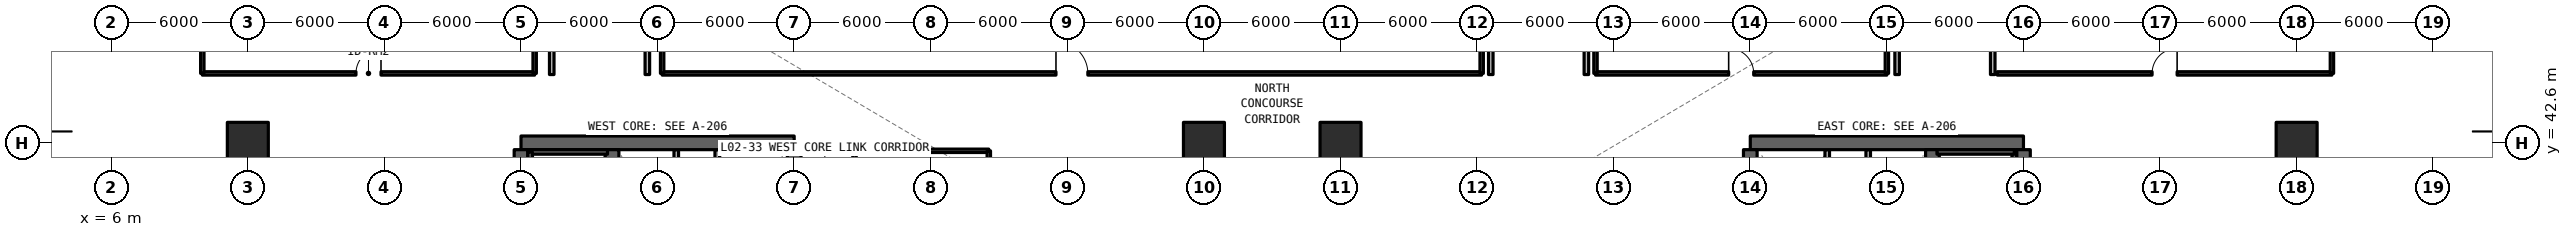
"""IFC4 building model, lengths in metres.
Left out: names, types, materials, properties, quantities, classifications, styles, units other than length and angle.
Written with IfcOpenShell. Run it as: python <this file> out.ifc"""

import sys

from ifc_helpers import new_model, si_unit, direction, frame, frame_2d, origin, origin_2d, place, context, subcontext, project, spatial, rectangle, extrude, element, fill, save


model = new_model("IFC4")
c1 = context("Model", 3, precision=1e-05, world=origin(), true_north=direction((0.0, 1.0)))
c2 = subcontext(c1, "Body", "Model", "MODEL_VIEW")
j1 = project(units=[si_unit("LENGTHUNIT", "METRE"), si_unit("PLANEANGLEUNIT", "RADIAN")], contexts=[c1])
p1 = place(None, origin())
s1 = spatial("IfcSite", under=j1, at=p1, CompositionType="ELEMENT")
p2 = place(p1, origin())
s2 = spatial("IfcBuilding", under=s1, at=p2, CompositionType="ELEMENT")
p3 = place(p2, frame((0.0, 0.0, 4.95)))
s3 = spatial("IfcBuildingStorey", under=s2, at=p3, CompositionType="ELEMENT", Elevation=4.95)
p4 = place(p3, frame((36.0, 42.6, 0.0), z_axis=(0.0, 0.0, 1.0), x_axis=(-1.0, 0.0, 0.0)))
e1 = element("IfcWall", 1, at=p4, inside=s3, PredefinedType="SHEAR", context=c2, shape_type="SweptSolid", body=[
    extrude(rectangle(XDim=12.0, YDim=0.6, at=frame_2d((6.0, 0.0))), origin(), (0.0, 0.0, 1.0), 4.95),
])
p5 = place(p3, frame((24.0, 24.9, 0.0), z_axis=(0.0, 0.0, 1.0), x_axis=(0.0, 1.0, 0.0)))
e2 = element("IfcWall", 2, at=p5, inside=s3, PredefinedType="SHEAR", context=c2, shape_type="SweptSolid", body=[
    extrude(rectangle(XDim=17.4, YDim=0.6, at=frame_2d((8.7, 0.0))), origin(), (0.0, 0.0, 1.0), 4.95),
])
p6 = place(p3, frame((36.0, 36.8, 0.0), z_axis=(0.0, 0.0, 1.0), x_axis=(0.0, 1.0, 0.0)))
e3 = element("IfcWall", 3, at=p6, inside=s3, PredefinedType="SHEAR", context=c2, shape_type="SweptSolid", body=[
    extrude(rectangle(XDim=5.5, YDim=0.6, at=frame_2d((2.75, 0.0))), origin(), (0.0, 0.0, 1.0), 4.95),
])
p7 = place(p3, frame((28.0, 24.9, 0.0), z_axis=(0.0, 0.0, 1.0), x_axis=(0.0, 1.0, 0.0)))
e4 = element("IfcWall", 4, at=p7, inside=s3, PredefinedType="SHEAR", context=c2, shape_type="SweptSolid", body=[
    extrude(rectangle(XDim=17.4, YDim=0.6, at=frame_2d((8.7, 0.0))), origin(), (0.0, 0.0, 1.0), 4.95),
])
p8 = place(p7, frame((0.35, 0.0, 0.0)))
e5 = element("IfcOpeningElement", 5, at=p8, cuts=e4, PredefinedType="OPENING", context=c2, shape_type="SweptSolid", body=[
    extrude(rectangle(XDim=1.15, YDim=2.15, at=frame_2d((0.575, 1.075))), frame((0.0, 0.31, 0.0), z_axis=(0.0, -1.0, 0.0), x_axis=(1.0, 0.0, 0.0)), (0.0, 0.0, 1.0), 0.62),
])
p9 = place(p7, frame((9.55, 0.0, 0.0)))
e6 = element("IfcOpeningElement", 6, at=p9, cuts=e4, PredefinedType="OPENING", context=c2, shape_type="SweptSolid", body=[
    extrude(rectangle(XDim=1.15, YDim=2.15, at=frame_2d((0.575, 1.075))), frame((0.0, 0.31, 0.0), z_axis=(0.0, -1.0, 0.0), x_axis=(1.0, 0.0, 0.0)), (0.0, 0.0, 1.0), 0.62),
])
p10 = place(p3, frame((90.0, 42.6, 0.0), z_axis=(0.0, 0.0, 1.0), x_axis=(-1.0, 0.0, 0.0)))
e7 = element("IfcWall", 7, at=p10, inside=s3, PredefinedType="SHEAR", context=c2, shape_type="SweptSolid", body=[
    extrude(rectangle(XDim=12.0, YDim=0.6, at=frame_2d((6.0, 0.0))), origin(), (0.0, 0.0, 1.0), 4.95),
])
p11 = place(p3, frame((90.0, 24.9, 0.0), z_axis=(0.0, 0.0, 1.0), x_axis=(0.0, 1.0, 0.0)))
e8 = element("IfcWall", 8, at=p11, inside=s3, PredefinedType="SHEAR", context=c2, shape_type="SweptSolid", body=[
    extrude(rectangle(XDim=17.4, YDim=0.6, at=frame_2d((8.7, 0.0))), origin(), (0.0, 0.0, 1.0), 4.95),
])
p12 = place(p3, frame((78.0, 36.8, 0.0), z_axis=(0.0, 0.0, 1.0), x_axis=(0.0, 1.0, 0.0)))
e9 = element("IfcWall", 9, at=p12, inside=s3, PredefinedType="SHEAR", context=c2, shape_type="SweptSolid", body=[
    extrude(rectangle(XDim=5.5, YDim=0.6, at=frame_2d((2.75, 0.0))), origin(), (0.0, 0.0, 1.0), 4.95),
])
p13 = place(p3, frame((86.0, 24.9, 0.0), z_axis=(0.0, 0.0, 1.0), x_axis=(0.0, 1.0, 0.0)))
e10 = element("IfcWall", 10, at=p13, inside=s3, PredefinedType="SHEAR", context=c2, shape_type="SweptSolid", body=[
    extrude(rectangle(XDim=17.4, YDim=0.6, at=frame_2d((8.7, 0.0))), origin(), (0.0, 0.0, 1.0), 4.95),
])
p14 = place(p13, frame((0.35, 0.0, 0.0)))
e11 = element("IfcOpeningElement", 11, at=p14, cuts=e10, PredefinedType="OPENING", context=c2, shape_type="SweptSolid", body=[
    extrude(rectangle(XDim=1.15, YDim=2.15, at=frame_2d((0.575, 1.075))), frame((0.0, 0.31, 0.0), z_axis=(0.0, -1.0, 0.0), x_axis=(1.0, 0.0, 0.0)), (0.0, 0.0, 1.0), 0.62),
])
p15 = place(p13, frame((9.55, 0.0, 0.0)))
e12 = element("IfcOpeningElement", 12, at=p15, cuts=e10, PredefinedType="OPENING", context=c2, shape_type="SweptSolid", body=[
    extrude(rectangle(XDim=1.15, YDim=2.15, at=frame_2d((0.575, 1.075))), frame((0.0, 0.31, 0.0), z_axis=(0.0, -1.0, 0.0), x_axis=(1.0, 0.0, 0.0)), (0.0, 0.0, 1.0), 0.62),
])
for number, where, z_axis, x_axis in (
    (13, (12.0, 42.6, 0.0), (0.0, 0.0, 1.0), (1.0, 0.0, 0.0)),
    (14, (54.0, 42.6, 0.0), (0.0, 0.0, 1.0), (1.0, 0.0, 0.0)),
    (15, (60.0, 42.6, 0.0), (0.0, 0.0, 1.0), (1.0, 0.0, 0.0)),
    (16, (102.0, 42.6, 0.0), (0.0, 0.0, 1.0), (1.0, 0.0, 0.0)),
):
    element("IfcColumn", number, at=place(p3, frame(where, z_axis=z_axis, x_axis=x_axis)), inside=s3, PredefinedType="COLUMN", context=c2, shape_type="SweptSolid", body=[
        extrude(rectangle(XDim=1.8, YDim=1.8, at=origin_2d()), origin(), (0.0, 0.0, 1.0), 4.95),
    ])
for number, where, z_axis, x_axis in (
    (17, (30.82, 36.88, 0.0), (0.0, 0.0, 1.0), (0.0, 1.0, 0.0)),
    (18, (32.62, 36.88, 0.0), (0.0, 0.0, 1.0), (0.0, 1.0, 0.0)),
    (19, (83.18, 36.88, 0.0), (0.0, 0.0, 1.0), (0.0, 1.0, 0.0)),
    (20, (81.38, 36.88, 0.0), (0.0, 0.0, 1.0), (0.0, 1.0, 0.0)),
):
    element("IfcWall", number, at=place(p3, frame(where, z_axis=z_axis, x_axis=x_axis)), inside=s3, PredefinedType="SOLIDWALL", context=c2, shape_type="SweptSolid", body=[
        extrude(rectangle(XDim=5.42, YDim=0.2, at=frame_2d((2.71, 0.0))), origin(), (0.0, 0.0, 1.0), 3.89),
    ])
for number, where, z_axis, x_axis in (
    (21, (25.35, 45.6, 0.0), (0.0, 0.0, 1.0), (0.0, 1.0, 0.0)),
    (22, (29.55, 45.6, 0.0), (0.0, 0.0, 1.0), (0.0, 1.0, 0.0)),
    (23, (66.6, 45.6, 0.0), (0.0, 0.0, 1.0), (0.0, 1.0, 0.0)),
    (24, (70.8, 45.6, 0.0), (0.0, 0.0, 1.0), (0.0, 1.0, 0.0)),
    (25, (84.45, 45.6, 0.0), (0.0, 0.0, 1.0), (0.0, 1.0, 0.0)),
    (26, (88.65, 45.6, 0.0), (0.0, 0.0, 1.0), (0.0, 1.0, 0.0)),
):
    element("IfcWall", number, at=place(p3, frame(where, z_axis=z_axis, x_axis=x_axis)), inside=s3, PredefinedType="SOLIDWALL", context=c2, shape_type="SweptSolid", body=[
        extrude(rectangle(XDim=4.6, YDim=0.2, at=frame_2d((2.3, 0.0))), origin(), (0.0, 0.0, 1.0), 3.89),
    ])
p16 = place(p3, frame((30.2, 45.65, 0.0), z_axis=(0.0, 0.0, 1.0), x_axis=(1.0, 0.0, 0.0)))
e27 = element("IfcWall", 27, at=p16, inside=s3, PredefinedType="SOLIDWALL", context=c2, shape_type="SweptSolid", body=[
    extrude(rectangle(XDim=36.0, YDim=0.15, at=frame_2d((18.0, 0.0))), origin(), (0.0, 0.0, 1.0), 3.89),
])
p17 = place(p16, frame((17.3, 0.0, 0.0)))
e28 = element("IfcOpeningElement", 28, at=p17, cuts=e27, PredefinedType="OPENING", context=c2, shape_type="SweptSolid", body=[
    extrude(rectangle(XDim=1.4, YDim=2.15, at=frame_2d((0.7, 1.075))), frame((0.0, 0.085, 0.0), z_axis=(0.0, -1.0, 0.0), x_axis=(1.0, 0.0, 0.0)), (0.0, 0.0, 1.0), 0.17),
])
for number, where, z_axis, x_axis in (
    (29, (30.2, 45.65, 0.0), (0.0, 0.0, 1.0), (0.0, 1.0, 0.0)),
    (30, (66.2, 45.65, 0.0), (0.0, 0.0, 1.0), (0.0, 1.0, 0.0)),
):
    element("IfcWall", number, at=place(p3, frame(where, z_axis=z_axis, x_axis=x_axis)), inside=s3, PredefinedType="SOLIDWALL", context=c2, shape_type="SweptSolid", body=[
        extrude(rectangle(XDim=20.25, YDim=0.15, at=frame_2d((10.125, 0.0))), origin(), (0.0, 0.0, 1.0), 3.89),
    ])
p18 = place(p3, frame((10.0, 45.65, 0.0), z_axis=(0.0, 0.0, 1.0), x_axis=(1.0, 0.0, 0.0)))
e31 = element("IfcWall", 31, at=p18, inside=s3, PredefinedType="SOLIDWALL", context=c2, shape_type="SweptSolid", body=[
    extrude(rectangle(XDim=14.6, YDim=0.15, at=frame_2d((7.3, 0.0))), origin(), (0.0, 0.0, 1.0), 3.89),
])
p19 = place(p18, frame((6.75, 0.0, 0.0)))
e32 = element("IfcOpeningElement", 32, at=p19, cuts=e31, PredefinedType="OPENING", context=c2, shape_type="SweptSolid", body=[
    extrude(rectangle(XDim=1.1, YDim=2.15, at=frame_2d((0.55, 1.075))), frame((0.0, 0.085, 0.0), z_axis=(0.0, -1.0, 0.0), x_axis=(1.0, 0.0, 0.0)), (0.0, 0.0, 1.0), 0.17),
])
for number, where, z_axis, x_axis in (
    (33, (10.0, 45.65, 0.0), (0.0, 0.0, 1.0), (0.0, 1.0, 0.0)),
    (34, (24.6, 45.65, 0.0), (0.0, 0.0, 1.0), (0.0, 1.0, 0.0)),
):
    element("IfcWall", number, at=place(p3, frame(where, z_axis=z_axis, x_axis=x_axis)), inside=s3, PredefinedType="SOLIDWALL", context=c2, shape_type="SweptSolid", body=[
        extrude(rectangle(XDim=20.25, YDim=0.15, at=frame_2d((10.125, 0.0))), origin(), (0.0, 0.0, 1.0), 3.89),
    ])
p20 = place(p3, frame((71.2, 45.65, 0.0), z_axis=(0.0, 0.0, 1.0), x_axis=(1.0, 0.0, 0.0)))
e35 = element("IfcWall", 35, at=p20, inside=s3, PredefinedType="SOLIDWALL", context=c2, shape_type="SweptSolid", body=[
    extrude(rectangle(XDim=12.8, YDim=0.15, at=frame_2d((6.4, 0.0))), origin(), (0.0, 0.0, 1.0), 3.89),
])
p21 = place(p20, frame((5.85, 0.0, 0.0)))
e36 = element("IfcOpeningElement", 36, at=p21, cuts=e35, PredefinedType="OPENING", context=c2, shape_type="SweptSolid", body=[
    extrude(rectangle(XDim=1.1, YDim=2.15, at=frame_2d((0.55, 1.075))), frame((0.0, 0.085, 0.0), z_axis=(0.0, -1.0, 0.0), x_axis=(1.0, 0.0, 0.0)), (0.0, 0.0, 1.0), 0.17),
])
for number, where, z_axis, x_axis in (
    (37, (71.2, 45.65, 0.0), (0.0, 0.0, 1.0), (0.0, 1.0, 0.0)),
    (38, (84.0, 45.65, 0.0), (0.0, 0.0, 1.0), (0.0, 1.0, 0.0)),
):
    element("IfcWall", number, at=place(p3, frame(where, z_axis=z_axis, x_axis=x_axis)), inside=s3, PredefinedType="SOLIDWALL", context=c2, shape_type="SweptSolid", body=[
        extrude(rectangle(XDim=20.25, YDim=0.15, at=frame_2d((10.125, 0.0))), origin(), (0.0, 0.0, 1.0), 3.89),
    ])
p22 = place(p3, frame((88.85, 45.65, 0.0), z_axis=(0.0, 0.0, 1.0), x_axis=(1.0, 0.0, 0.0)))
e39 = element("IfcWall", 39, at=p22, inside=s3, PredefinedType="SOLIDWALL", context=c2, shape_type="SweptSolid", body=[
    extrude(rectangle(XDim=14.7, YDim=0.15, at=frame_2d((7.35, 0.0))), origin(), (0.0, 0.0, 1.0), 3.89),
])
p23 = place(p22, frame((6.8, 0.0, 0.0)))
e40 = element("IfcOpeningElement", 40, at=p23, cuts=e39, PredefinedType="OPENING", context=c2, shape_type="SweptSolid", body=[
    extrude(rectangle(XDim=1.1, YDim=2.15, at=frame_2d((0.55, 1.075))), frame((0.0, 0.085, 0.0), z_axis=(0.0, -1.0, 0.0), x_axis=(1.0, 0.0, 0.0)), (0.0, 0.0, 1.0), 0.17),
])
p24 = place(p3, frame((103.55, 45.65, 0.0), z_axis=(0.0, 0.0, 1.0), x_axis=(0.0, 1.0, 0.0)))
e41 = element("IfcWall", 41, at=p24, inside=s3, PredefinedType="SOLIDWALL", context=c2, shape_type="SweptSolid", body=[
    extrude(rectangle(XDim=20.25, YDim=0.15, at=frame_2d((10.125, 0.0))), origin(), (0.0, 0.0, 1.0), 3.89),
])
p25 = place(p3, frame((38.65, 42.25, 0.0), z_axis=(0.0, 0.0, 1.0), x_axis=(1.0, 0.0, 0.0)))
e42 = element("IfcWall", 42, at=p25, inside=s3, PredefinedType="SOLIDWALL", context=c2, shape_type="SweptSolid", body=[
    extrude(rectangle(XDim=5.9, YDim=0.15, at=frame_2d((2.95, 0.0))), origin(), (0.0, 0.0, 1.0), 3.89),
])
p26 = place(p3, frame((38.65, 24.95, 0.0), z_axis=(0.0, 0.0, 1.0), x_axis=(0.0, 1.0, 0.0)))
e43 = element("IfcWall", 43, at=p26, inside=s3, PredefinedType="SOLIDWALL", context=c2, shape_type="SweptSolid", body=[
    extrude(rectangle(XDim=17.3, YDim=0.15, at=frame_2d((8.65, 0.0))), origin(), (0.0, 0.0, 1.0), 3.89),
])
p27 = place(p26, frame((7.525, 0.0, 0.0)))
e44 = element("IfcOpeningElement", 44, at=p27, cuts=e43, PredefinedType="OPENING", context=c2, shape_type="SweptSolid", body=[
    extrude(rectangle(XDim=0.95, YDim=2.15, at=frame_2d((0.475, 1.075))), frame((0.0, 0.085, 0.0), z_axis=(0.0, -1.0, 0.0), x_axis=(1.0, 0.0, 0.0)), (0.0, 0.0, 1.0), 0.17),
])
p28 = place(p3, frame((44.55, 24.95, 0.0), z_axis=(0.0, 0.0, 1.0), x_axis=(0.0, 1.0, 0.0)))
e45 = element("IfcWall", 45, at=p28, inside=s3, PredefinedType="SOLIDWALL", context=c2, shape_type="SweptSolid", body=[
    extrude(rectangle(XDim=17.3, YDim=0.15, at=frame_2d((8.65, 0.0))), origin(), (0.0, 0.0, 1.0), 3.89),
])
p29 = place(p3, frame((27.8, 42.2, 0.0), z_axis=(0.0, 0.0, 1.0), x_axis=(-1.0, 0.0, 0.0)))
e46 = element("IfcWall", 46, at=p29, inside=s3, PredefinedType="SOLIDWALL", context=c2, shape_type="SweptSolid", body=[
    extrude(rectangle(XDim=3.4, YDim=0.2, at=frame_2d((1.7, 0.0))), origin(), (0.0, 0.0, 1.0), 4.95),
])
for number, where, z_axis, x_axis in (
    (47, (24.4, 42.2, 0.0), (0.0, 0.0, 1.0), (0.0, -1.0, 0.0)),
    (48, (89.6, 34.2, 0.0), (0.0, 0.0, 1.0), (0.0, 1.0, 0.0)),
):
    element("IfcWall", number, at=place(p3, frame(where, z_axis=z_axis, x_axis=x_axis)), inside=s3, PredefinedType="SOLIDWALL", context=c2, shape_type="SweptSolid", body=[
        extrude(rectangle(XDim=8.0, YDim=0.2, at=frame_2d((4.0, 0.0))), origin(), (0.0, 0.0, 1.0), 4.95),
    ])
p30 = place(p3, frame((89.6, 42.2, 0.0), z_axis=(0.0, 0.0, 1.0), x_axis=(-1.0, 0.0, 0.0)))
e49 = element("IfcWall", 49, at=p30, inside=s3, PredefinedType="SOLIDWALL", context=c2, shape_type="SweptSolid", body=[
    extrude(rectangle(XDim=3.4, YDim=0.2, at=frame_2d((1.7, 0.0))), origin(), (0.0, 0.0, 1.0), 4.95),
])
p31 = place(p17, origin())
e50 = element("IfcDoor", 50, at=p31, inside=s3, OperationType="SINGLE_SWING_LEFT", PredefinedType="DOOR", context=c2, shape_type="SweptSolid", body=[
    extrude(rectangle(XDim=1.4, YDim=2.15, at=frame_2d((0.7, 1.075))), frame((0.0, 0.025, 0.0), z_axis=(0.0, -1.0, 0.0), x_axis=(1.0, 0.0, 0.0)), (0.0, 0.0, 1.0), 0.05),
])
fill(e28, e50)
p32 = place(p19, origin())
e51 = element("IfcDoor", 51, at=p32, inside=s3, OperationType="SINGLE_SWING_RIGHT", PredefinedType="DOOR", context=c2, shape_type="SweptSolid", body=[
    extrude(rectangle(XDim=1.1, YDim=2.15, at=frame_2d((0.55, 1.075))), frame((0.0, 0.025, 0.0), z_axis=(0.0, -1.0, 0.0), x_axis=(1.0, 0.0, 0.0)), (0.0, 0.0, 1.0), 0.05),
])
fill(e32, e51)
p33 = place(p21, origin())
e52 = element("IfcDoor", 52, at=p33, inside=s3, OperationType="SINGLE_SWING_LEFT", PredefinedType="DOOR", context=c2, shape_type="SweptSolid", body=[
    extrude(rectangle(XDim=1.1, YDim=2.15, at=frame_2d((0.55, 1.075))), frame((0.0, 0.025, 0.0), z_axis=(0.0, -1.0, 0.0), x_axis=(1.0, 0.0, 0.0)), (0.0, 0.0, 1.0), 0.05),
])
fill(e36, e52)
p34 = place(p23, origin())
e53 = element("IfcDoor", 53, at=p34, inside=s3, OperationType="SINGLE_SWING_RIGHT", PredefinedType="DOOR", context=c2, shape_type="SweptSolid", body=[
    extrude(rectangle(XDim=1.1, YDim=2.15, at=frame_2d((0.55, 1.075))), frame((0.0, 0.025, 0.0), z_axis=(0.0, -1.0, 0.0), x_axis=(1.0, 0.0, 0.0)), (0.0, 0.0, 1.0), 0.05),
])
fill(e40, e53)
save(model, sys.argv[1])
